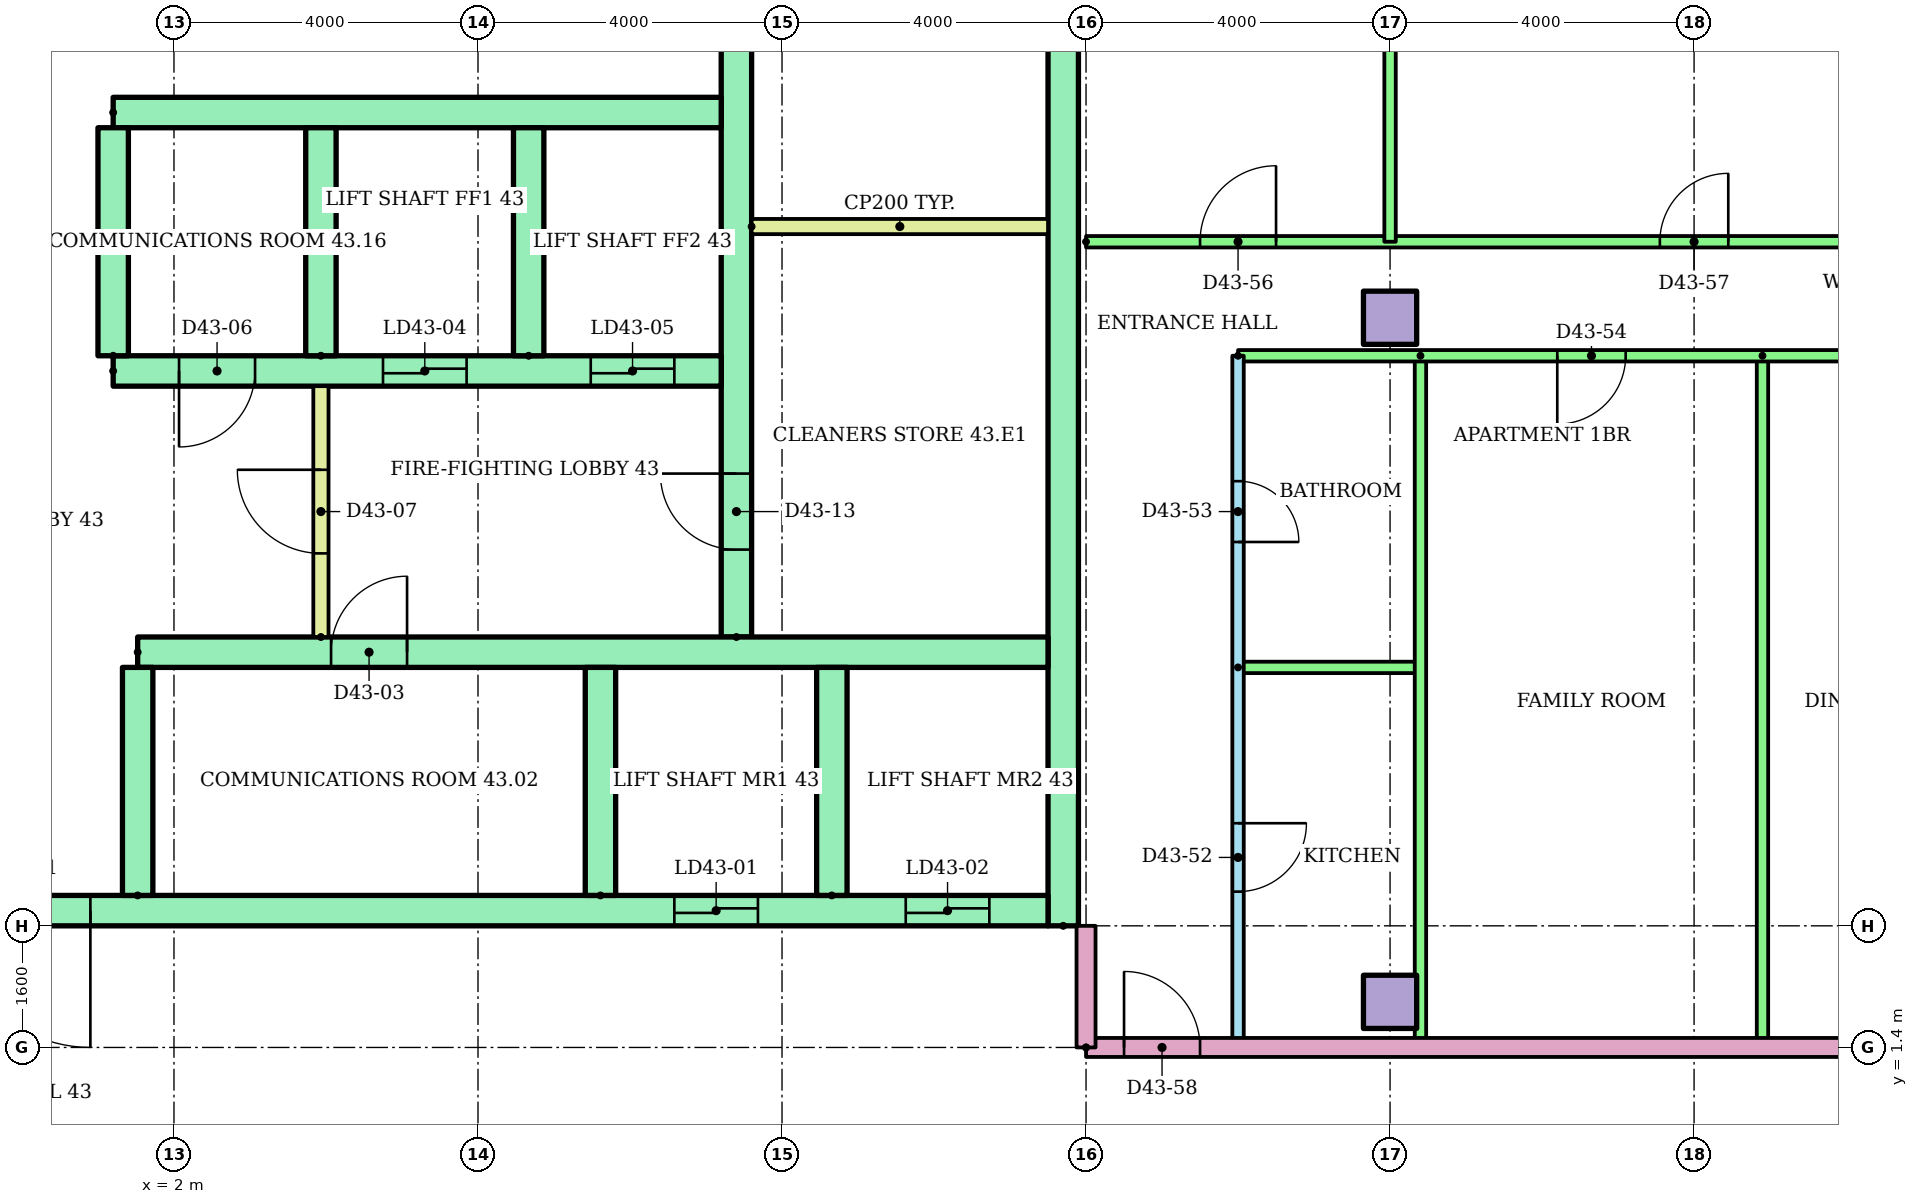
"""IFC4 building model, lengths in metres.
Left out: names, types, materials, properties, quantities, classifications, styles, units other than length and angle.
Written with IfcOpenShell. Run it as: python <this file> out.ifc"""

import sys

from ifc_helpers import new_model, si_unit, direction, frame, frame_2d, origin, origin_2d, place, context, subcontext, project, spatial, rectangle, extrude, element, fill, save


model = new_model("IFC4")
c1 = context("Model", 3, precision=1e-05, world=origin(), true_north=direction((0.0, 1.0)))
c2 = subcontext(c1, "Body", "Model", "MODEL_VIEW")
j1 = project(units=[si_unit("LENGTHUNIT", "METRE"), si_unit("PLANEANGLEUNIT", "RADIAN")], contexts=[c1])
p1 = place(None, origin())
s1 = spatial("IfcSite", under=j1, at=p1, CompositionType="ELEMENT")
p2 = place(p1, origin())
s2 = spatial("IfcBuilding", under=s1, at=p2, CompositionType="ELEMENT")
p3 = place(p2, frame((0.0, 0.0, 168.5)))
s3 = spatial("IfcBuildingStorey", under=s2, at=p3, CompositionType="ELEMENT", Elevation=168.5)
for number, where in (
    (1, (18.0, 2.0, 0.0)),
    (2, (18.0, 11.0, 0.0)),
):
    element("IfcColumn", number, at=place(p3, frame(where)), inside=s3, PredefinedType="COLUMN", context=c2, shape_type="SweptSolid", body=[
        extrude(rectangle(XDim=0.7, YDim=0.7, at=origin_2d()), origin(), (0.0, 0.0, 1.0), 3.2),
    ])
p4 = place(p3, frame((13.7, 3.0, 0.0), z_axis=(0.0, 0.0, 1.0), x_axis=(0.0, 1.0, 0.0)))
e3 = element("IfcWall", 3, at=p4, inside=s3, PredefinedType="SHEAR", context=c2, shape_type="SweptSolid", body=[
    extrude(rectangle(XDim=17.0, YDim=0.4, at=frame_2d((8.5, 0.0))), origin(), (0.0, 0.0, 1.0), 2.92),
])
p5 = place(p3, frame((9.4, 6.8, 0.0), z_axis=(0.0, 0.0, 1.0), x_axis=(0.0, 1.0, 0.0)))
e4 = element("IfcWall", 4, at=p5, inside=s3, PredefinedType="SHEAR", context=c2, shape_type="SweptSolid", body=[
    extrude(rectangle(XDim=12.7, YDim=0.4, at=frame_2d((6.35, 0.0))), origin(), (0.0, 0.0, 1.0), 2.92),
])
p6 = place(p5, frame((1.15, 0.0, 0.0)))
e5 = element("IfcOpeningElement", 5, at=p6, cuts=e4, PredefinedType="OPENING", context=c2, shape_type="SweptSolid", body=[
    extrude(rectangle(XDim=1.0, YDim=2.1, at=frame_2d((0.5, 1.05))), frame((0.0, 0.21, 0.0), z_axis=(0.0, -1.0, 0.0), x_axis=(1.0, 0.0, 0.0)), (0.0, 0.0, 1.0), 0.42),
])
p7 = place(p5, frame((7.925, 0.0, 0.0)))
e6 = element("IfcOpeningElement", 6, at=p7, cuts=e4, PredefinedType="OPENING", context=c2, shape_type="SweptSolid", body=[
    extrude(rectangle(XDim=1.0, YDim=2.1, at=frame_2d((0.5, 1.05))), frame((0.0, 0.21, 0.0), z_axis=(0.0, -1.0, 0.0), x_axis=(1.0, 0.0, 0.0)), (0.0, 0.0, 1.0), 0.42),
])
p8 = place(p3, frame((-13.5, 3.2, 0.0)))
e7 = element("IfcWall", 7, at=p8, inside=s3, PredefinedType="SHEAR", context=c2, shape_type="SweptSolid", body=[
    extrude(rectangle(XDim=27.0, YDim=0.4, at=frame_2d((13.5, 0.0))), origin(), (0.0, 0.0, 1.0), 2.92),
])
p9 = place(p8, frame((22.083, 0.0, 0.0)))
e8 = element("IfcOpeningElement", 8, at=p9, cuts=e7, PredefinedType="OPENING", context=c2, shape_type="SweptSolid", body=[
    extrude(rectangle(XDim=1.1, YDim=2.1, at=frame_2d((0.55, 1.05))), frame((0.0, 0.21, 0.0), z_axis=(0.0, -1.0, 0.0), x_axis=(1.0, 0.0, 0.0)), (0.0, 0.0, 1.0), 0.42),
])
p10 = place(p8, frame((25.128, 0.0, 0.0)))
e9 = element("IfcOpeningElement", 9, at=p10, cuts=e7, PredefinedType="OPENING", context=c2, shape_type="SweptSolid", body=[
    extrude(rectangle(XDim=1.1, YDim=2.1, at=frame_2d((0.55, 1.05))), frame((0.0, 0.21, 0.0), z_axis=(0.0, -1.0, 0.0), x_axis=(1.0, 0.0, 0.0)), (0.0, 0.0, 1.0), 0.42),
])
p11 = place(p8, frame((12.6, 0.0, 0.0)))
e10 = element("IfcOpeningElement", 10, at=p11, cuts=e7, PredefinedType="OPENING", context=c2, shape_type="SweptSolid", body=[
    extrude(rectangle(XDim=1.8, YDim=2.1, at=frame_2d((0.9, 1.05))), frame((0.0, 0.21, 0.0), z_axis=(0.0, -1.0, 0.0), x_axis=(1.0, 0.0, 0.0)), (0.0, 0.0, 1.0), 0.42),
])
p12 = place(p3, frame((1.522, 6.6, 0.0)))
e11 = element("IfcWall", 11, at=p12, inside=s3, PredefinedType="SHEAR", context=c2, shape_type="SweptSolid", body=[
    extrude(rectangle(XDim=11.978, YDim=0.4, at=frame_2d((5.989, 0.0))), origin(), (0.0, 0.0, 1.0), 2.92),
])
p13 = place(p12, frame((2.544, 0.0, 0.0)))
e12 = element("IfcOpeningElement", 12, at=p13, cuts=e11, PredefinedType="OPENING", context=c2, shape_type="SweptSolid", body=[
    extrude(rectangle(XDim=1.0, YDim=2.1, at=frame_2d((0.5, 1.05))), frame((0.0, 0.21, 0.0), z_axis=(0.0, -1.0, 0.0), x_axis=(1.0, 0.0, 0.0)), (0.0, 0.0, 1.0), 0.42),
])
for number, where, z_axis, x_axis in (
    (13, (1.522, 3.4, 0.0), (0.0, 0.0, 1.0), (0.0, 1.0, 0.0)),
    (14, (7.611, 3.4, 0.0), (0.0, 0.0, 1.0), (0.0, 1.0, 0.0)),
    (15, (10.656, 3.4, 0.0), (0.0, 0.0, 1.0), (0.0, 1.0, 0.0)),
):
    element("IfcWall", number, at=place(p3, frame(where, z_axis=z_axis, x_axis=x_axis)), inside=s3, PredefinedType="SHEAR", context=c2, shape_type="SweptSolid", body=[
        extrude(rectangle(XDim=3.0, YDim=0.4, at=frame_2d((1.5, 0.0))), origin(), (0.0, 0.0, 1.0), 2.92),
    ])
p14 = place(p3, frame((1.2, 10.3, 0.0)))
e16 = element("IfcWall", 16, at=p14, inside=s3, PredefinedType="SHEAR", context=c2, shape_type="SweptSolid", body=[
    extrude(rectangle(XDim=8.0, YDim=0.4, at=frame_2d((4.0, 0.0))), origin(), (0.0, 0.0, 1.0), 2.92),
])
p15 = place(p14, frame((3.55, 0.0, 0.0)))
e17 = element("IfcOpeningElement", 17, at=p15, cuts=e16, PredefinedType="OPENING", context=c2, shape_type="SweptSolid", body=[
    extrude(rectangle(XDim=1.1, YDim=2.1, at=frame_2d((0.55, 1.05))), frame((0.0, 0.21, 0.0), z_axis=(0.0, -1.0, 0.0), x_axis=(1.0, 0.0, 0.0)), (0.0, 0.0, 1.0), 0.42),
])
p16 = place(p14, frame((6.283, 0.0, 0.0)))
e18 = element("IfcOpeningElement", 18, at=p16, cuts=e16, PredefinedType="OPENING", context=c2, shape_type="SweptSolid", body=[
    extrude(rectangle(XDim=1.1, YDim=2.1, at=frame_2d((0.55, 1.05))), frame((0.0, 0.21, 0.0), z_axis=(0.0, -1.0, 0.0), x_axis=(1.0, 0.0, 0.0)), (0.0, 0.0, 1.0), 0.42),
])
p17 = place(p14, frame((0.867, 0.0, 0.0)))
e19 = element("IfcOpeningElement", 19, at=p17, cuts=e16, PredefinedType="OPENING", context=c2, shape_type="SweptSolid", body=[
    extrude(rectangle(XDim=1.0, YDim=2.1, at=frame_2d((0.5, 1.05))), frame((0.0, 0.21, 0.0), z_axis=(0.0, -1.0, 0.0), x_axis=(1.0, 0.0, 0.0)), (0.0, 0.0, 1.0), 0.42),
])
p18 = place(p3, frame((1.2, 13.7, 0.0)))
e20 = element("IfcWall", 20, at=p18, inside=s3, PredefinedType="SHEAR", context=c2, shape_type="SweptSolid", body=[
    extrude(rectangle(XDim=8.0, YDim=0.4, at=frame_2d((4.0, 0.0))), origin(), (0.0, 0.0, 1.0), 2.92),
])
for number, where, z_axis, x_axis in (
    (21, (1.2, 10.5, 0.0), (0.0, 0.0, 1.0), (0.0, 1.0, 0.0)),
    (22, (3.933, 10.5, 0.0), (0.0, 0.0, 1.0), (0.0, 1.0, 0.0)),
    (23, (6.667, 10.5, 0.0), (0.0, 0.0, 1.0), (0.0, 1.0, 0.0)),
):
    element("IfcWall", number, at=place(p3, frame(where, z_axis=z_axis, x_axis=x_axis)), inside=s3, PredefinedType="SHEAR", context=c2, shape_type="SweptSolid", body=[
        extrude(rectangle(XDim=3.0, YDim=0.4, at=frame_2d((1.5, 0.0))), origin(), (0.0, 0.0, 1.0), 2.92),
    ])
p19 = place(p3, frame((3.933, 6.8, 0.0), z_axis=(0.0, 0.0, 1.0), x_axis=(0.0, 1.0, 0.0)))
e24 = element("IfcWall", 24, at=p19, inside=s3, PredefinedType="PARTITIONING", context=c2, shape_type="SweptSolid", body=[
    extrude(rectangle(XDim=3.3, YDim=0.2, at=frame_2d((1.65, 0.0))), origin(), (0.0, 0.0, 1.0), 2.92),
])
p20 = place(p19, frame((1.1, 0.0, 0.0)))
e25 = element("IfcOpeningElement", 25, at=p20, cuts=e24, PredefinedType="OPENING", context=c2, shape_type="SweptSolid", body=[
    extrude(rectangle(XDim=1.1, YDim=2.1, at=frame_2d((0.55, 1.05))), frame((0.0, 0.11, 0.0), z_axis=(0.0, -1.0, 0.0), x_axis=(1.0, 0.0, 0.0)), (0.0, 0.0, 1.0), 0.22),
])
p21 = place(p3, frame((9.6, 12.2, 0.0)))
e26 = element("IfcWall", 26, at=p21, inside=s3, PredefinedType="PARTITIONING", context=c2, shape_type="SweptSolid", body=[
    extrude(rectangle(XDim=3.9, YDim=0.2, at=frame_2d((1.95, 0.0))), origin(), (0.0, 0.0, 1.0), 2.92),
])
p22 = place(p3, frame((16.0, 10.5, 0.0), z_axis=(0.0, 0.0, 1.0), x_axis=(0.0, -1.0, 0.0)))
e27 = element("IfcWall", 27, at=p22, inside=s3, PredefinedType="PARTITIONING", context=c2, shape_type="SweptSolid", body=[
    extrude(rectangle(XDim=9.1, YDim=0.15, at=frame_2d((4.55, 0.0))), origin(), (0.0, 0.0, 1.0), 2.4),
])
p23 = place(p22, frame((6.15, 0.0, 0.0)))
e28 = element("IfcOpeningElement", 28, at=p23, cuts=e27, PredefinedType="OPENING", context=c2, shape_type="SweptSolid", body=[
    extrude(rectangle(XDim=0.9, YDim=2.1, at=frame_2d((0.45, 1.05))), frame((0.0, 0.085, 0.0), z_axis=(0.0, -1.0, 0.0), x_axis=(1.0, 0.0, 0.0)), (0.0, 0.0, 1.0), 0.17),
])
p24 = place(p22, frame((1.65, 0.0, 0.0)))
e29 = element("IfcOpeningElement", 29, at=p24, cuts=e27, PredefinedType="OPENING", context=c2, shape_type="SweptSolid", body=[
    extrude(rectangle(XDim=0.8, YDim=2.1, at=frame_2d((0.4, 1.05))), frame((0.0, 0.085, 0.0), z_axis=(0.0, -1.0, 0.0), x_axis=(1.0, 0.0, 0.0)), (0.0, 0.0, 1.0), 0.17),
])
p25 = place(p3, frame((16.0, 6.4, 0.0)))
e30 = element("IfcWall", 30, at=p25, inside=s3, PredefinedType="PARTITIONING", context=c2, shape_type="SweptSolid", body=[
    extrude(rectangle(XDim=2.4, YDim=0.15, at=frame_2d((1.2, 0.0))), origin(), (0.0, 0.0, 1.0), 2.4),
])
for number, where, z_axis, x_axis in (
    (31, (18.4, 10.5, 0.0), (0.0, 0.0, 1.0), (0.0, -1.0, 0.0)),
    (32, (22.9, 10.5, 0.0), (0.0, 0.0, 1.0), (0.0, -1.0, 0.0)),
):
    element("IfcWall", number, at=place(p3, frame(where, z_axis=z_axis, x_axis=x_axis)), inside=s3, PredefinedType="PARTITIONING", context=c2, shape_type="SweptSolid", body=[
        extrude(rectangle(XDim=9.1, YDim=0.15, at=frame_2d((4.55, 0.0))), origin(), (0.0, 0.0, 1.0), 2.4),
    ])
p26 = place(p3, frame((26.0, 10.5, 0.0), z_axis=(0.0, 0.0, 1.0), x_axis=(-1.0, 0.0, 0.0)))
e33 = element("IfcWall", 33, at=p26, inside=s3, PredefinedType="PARTITIONING", context=c2, shape_type="SweptSolid", body=[
    extrude(rectangle(XDim=10.0, YDim=0.15, at=frame_2d((5.0, 0.0))), origin(), (0.0, 0.0, 1.0), 2.4),
])
p27 = place(p26, frame((4.9, 0.0, 0.0)))
e34 = element("IfcOpeningElement", 34, at=p27, cuts=e33, PredefinedType="OPENING", context=c2, shape_type="SweptSolid", body=[
    extrude(rectangle(XDim=0.9, YDim=2.1, at=frame_2d((0.45, 1.05))), frame((0.0, 0.085, 0.0), z_axis=(0.0, -1.0, 0.0), x_axis=(1.0, 0.0, 0.0)), (0.0, 0.0, 1.0), 0.17),
])
p28 = place(p26, frame((1.1, 0.0, 0.0)))
e35 = element("IfcOpeningElement", 35, at=p28, cuts=e33, PredefinedType="OPENING", context=c2, shape_type="SweptSolid", body=[
    extrude(rectangle(XDim=0.9, YDim=2.1, at=frame_2d((0.45, 1.05))), frame((0.0, 0.085, 0.0), z_axis=(0.0, -1.0, 0.0), x_axis=(1.0, 0.0, 0.0)), (0.0, 0.0, 1.0), 0.17),
])
p29 = place(p3, frame((14.0, 12.0, 0.0)))
e36 = element("IfcWall", 36, at=p29, inside=s3, PredefinedType="PARTITIONING", context=c2, shape_type="SweptSolid", body=[
    extrude(rectangle(XDim=12.0, YDim=0.15, at=frame_2d((6.0, 0.0))), origin(), (0.0, 0.0, 1.0), 2.4),
])
p30 = place(p29, frame((1.5, 0.0, 0.0)))
e37 = element("IfcOpeningElement", 37, at=p30, cuts=e36, PredefinedType="OPENING", context=c2, shape_type="SweptSolid", body=[
    extrude(rectangle(XDim=1.0, YDim=2.1, at=frame_2d((0.5, 1.05))), frame((0.0, 0.085, 0.0), z_axis=(0.0, -1.0, 0.0), x_axis=(1.0, 0.0, 0.0)), (0.0, 0.0, 1.0), 0.17),
])
p31 = place(p29, frame((7.55, 0.0, 0.0)))
e38 = element("IfcOpeningElement", 38, at=p31, cuts=e36, PredefinedType="OPENING", context=c2, shape_type="SweptSolid", body=[
    extrude(rectangle(XDim=0.9, YDim=2.1, at=frame_2d((0.45, 1.05))), frame((0.0, 0.085, 0.0), z_axis=(0.0, -1.0, 0.0), x_axis=(1.0, 0.0, 0.0)), (0.0, 0.0, 1.0), 0.17),
])
p32 = place(p3, frame((18.0, 18.821, 0.0), z_axis=(0.0, 0.0, 1.0), x_axis=(0.0, -1.0, 0.0)))
e39 = element("IfcWall", 39, at=p32, inside=s3, PredefinedType="PARTITIONING", context=c2, shape_type="SweptSolid", body=[
    extrude(rectangle(XDim=6.821, YDim=0.15, at=frame_2d((3.411, 0.0))), origin(), (0.0, 0.0, 1.0), 2.4),
])
p33 = place(p3, frame((14.0, 1.4, 0.0)))
e40 = element("IfcWall", 40, at=p33, inside=s3, PredefinedType="PARTITIONING", context=c2, shape_type="SweptSolid", body=[
    extrude(rectangle(XDim=15.0, YDim=0.25, at=frame_2d((7.5, 0.0))), origin(), (0.0, 0.0, 1.0), 2.4),
])
p34 = place(p33, frame((0.5, 0.0, 0.0)))
e41 = element("IfcOpeningElement", 41, at=p34, cuts=e40, PredefinedType="OPENING", context=c2, shape_type="SweptSolid", body=[
    extrude(rectangle(XDim=1.0, YDim=2.1, at=frame_2d((0.5, 1.05))), frame((0.0, 0.135, 0.0), z_axis=(0.0, -1.0, 0.0), x_axis=(1.0, 0.0, 0.0)), (0.0, 0.0, 1.0), 0.27),
])
p35 = place(p33, frame((12.547, 0.0, 0.0)))
e42 = element("IfcOpeningElement", 42, at=p35, cuts=e40, PredefinedType="OPENING", context=c2, shape_type="SweptSolid", body=[
    extrude(rectangle(XDim=1.0, YDim=2.1, at=frame_2d((0.5, 1.05))), frame((0.0, 0.135, 0.0), z_axis=(0.0, -1.0, 0.0), x_axis=(1.0, 0.0, 0.0)), (0.0, 0.0, 1.0), 0.27),
])
p36 = place(p3, frame((14.0, 1.4, 0.0), z_axis=(0.0, 0.0, 1.0), x_axis=(0.0, 1.0, 0.0)))
e43 = element("IfcWall", 43, at=p36, inside=s3, PredefinedType="PARTITIONING", context=c2, shape_type="SweptSolid", body=[
    extrude(rectangle(XDim=1.6, YDim=0.25, at=frame_2d((0.8, 0.0))), origin(), (0.0, 0.0, 1.0), 2.4),
])
p37 = place(p9, origin())
e44 = element("IfcDoor", 44, at=p37, inside=s3, OperationType="SLIDING_TO_LEFT", PredefinedType="DOOR", context=c2, shape_type="SweptSolid", body=[
    extrude(rectangle(XDim=1.1, YDim=2.1, at=frame_2d((0.55, 1.05))), frame((0.0, 0.025, 0.0), z_axis=(0.0, -1.0, 0.0), x_axis=(1.0, 0.0, 0.0)), (0.0, 0.0, 1.0), 0.05),
])
fill(e8, e44)
p38 = place(p10, origin())
e45 = element("IfcDoor", 45, at=p38, inside=s3, OperationType="SLIDING_TO_LEFT", PredefinedType="DOOR", context=c2, shape_type="SweptSolid", body=[
    extrude(rectangle(XDim=1.1, YDim=2.1, at=frame_2d((0.55, 1.05))), frame((0.0, 0.025, 0.0), z_axis=(0.0, -1.0, 0.0), x_axis=(1.0, 0.0, 0.0)), (0.0, 0.0, 1.0), 0.05),
])
fill(e9, e45)
p39 = place(p11, frame((1.8, 0.0, 0.0), z_axis=(0.0, 0.0, 1.0), x_axis=(-1.0, 0.0, 0.0)))
e46 = element("IfcDoor", 46, at=p39, inside=s3, OperationType="DOUBLE_DOOR_SINGLE_SWING", PredefinedType="DOOR", context=c2, shape_type="SweptSolid", body=[
    extrude(rectangle(XDim=1.8, YDim=2.1, at=frame_2d((0.9, 1.05))), frame((0.0, 0.025, 0.0), z_axis=(0.0, -1.0, 0.0), x_axis=(1.0, 0.0, 0.0)), (0.0, 0.0, 1.0), 0.05),
])
fill(e10, e46)
p40 = place(p13, origin())
e47 = element("IfcDoor", 47, at=p40, inside=s3, OperationType="SINGLE_SWING_RIGHT", PredefinedType="DOOR", context=c2, shape_type="SweptSolid", body=[
    extrude(rectangle(XDim=1.0, YDim=2.1, at=frame_2d((0.5, 1.05))), frame((0.0, 0.025, 0.0), z_axis=(0.0, -1.0, 0.0), x_axis=(1.0, 0.0, 0.0)), (0.0, 0.0, 1.0), 0.05),
])
fill(e12, e47)
p41 = place(p15, origin())
e48 = element("IfcDoor", 48, at=p41, inside=s3, OperationType="SLIDING_TO_LEFT", PredefinedType="DOOR", context=c2, shape_type="SweptSolid", body=[
    extrude(rectangle(XDim=1.1, YDim=2.1, at=frame_2d((0.55, 1.05))), frame((0.0, 0.025, 0.0), z_axis=(0.0, -1.0, 0.0), x_axis=(1.0, 0.0, 0.0)), (0.0, 0.0, 1.0), 0.05),
])
fill(e17, e48)
p42 = place(p16, origin())
e49 = element("IfcDoor", 49, at=p42, inside=s3, OperationType="SLIDING_TO_LEFT", PredefinedType="DOOR", context=c2, shape_type="SweptSolid", body=[
    extrude(rectangle(XDim=1.1, YDim=2.1, at=frame_2d((0.55, 1.05))), frame((0.0, 0.025, 0.0), z_axis=(0.0, -1.0, 0.0), x_axis=(1.0, 0.0, 0.0)), (0.0, 0.0, 1.0), 0.05),
])
fill(e18, e49)
p43 = place(p17, frame((1.0, 0.0, 0.0), z_axis=(0.0, 0.0, 1.0), x_axis=(-1.0, 0.0, 0.0)))
e50 = element("IfcDoor", 50, at=p43, inside=s3, OperationType="SINGLE_SWING_LEFT", PredefinedType="DOOR", context=c2, shape_type="SweptSolid", body=[
    extrude(rectangle(XDim=1.0, YDim=2.1, at=frame_2d((0.5, 1.05))), frame((0.0, 0.025, 0.0), z_axis=(0.0, -1.0, 0.0), x_axis=(1.0, 0.0, 0.0)), (0.0, 0.0, 1.0), 0.05),
])
fill(e19, e50)
p44 = place(p20, origin())
e51 = element("IfcDoor", 51, at=p44, inside=s3, OperationType="SINGLE_SWING_RIGHT", PredefinedType="DOOR", context=c2, shape_type="SweptSolid", body=[
    extrude(rectangle(XDim=1.1, YDim=2.1, at=frame_2d((0.55, 1.05))), frame((0.0, 0.025, 0.0), z_axis=(0.0, -1.0, 0.0), x_axis=(1.0, 0.0, 0.0)), (0.0, 0.0, 1.0), 0.05),
])
fill(e25, e51)
p45 = place(p6, origin())
e52 = element("IfcDoor", 52, at=p45, inside=s3, OperationType="SINGLE_SWING_RIGHT", PredefinedType="DOOR", context=c2, shape_type="SweptSolid", body=[
    extrude(rectangle(XDim=1.0, YDim=2.1, at=frame_2d((0.5, 1.05))), frame((0.0, 0.025, 0.0), z_axis=(0.0, -1.0, 0.0), x_axis=(1.0, 0.0, 0.0)), (0.0, 0.0, 1.0), 0.05),
])
fill(e5, e52)
p46 = place(p23, origin())
e53 = element("IfcDoor", 53, at=p46, inside=s3, OperationType="SINGLE_SWING_LEFT", PredefinedType="DOOR", context=c2, shape_type="SweptSolid", body=[
    extrude(rectangle(XDim=0.9, YDim=2.1, at=frame_2d((0.45, 1.05))), frame((0.0, 0.025, 0.0), z_axis=(0.0, -1.0, 0.0), x_axis=(1.0, 0.0, 0.0)), (0.0, 0.0, 1.0), 0.05),
])
fill(e28, e53)
p47 = place(p24, origin())
e54 = element("IfcDoor", 54, at=p47, inside=s3, OperationType="SINGLE_SWING_RIGHT", PredefinedType="DOOR", context=c2, shape_type="SweptSolid", body=[
    extrude(rectangle(XDim=0.8, YDim=2.1, at=frame_2d((0.4, 1.05))), frame((0.0, 0.025, 0.0), z_axis=(0.0, -1.0, 0.0), x_axis=(1.0, 0.0, 0.0)), (0.0, 0.0, 1.0), 0.05),
])
fill(e29, e54)
p48 = place(p27, origin())
e55 = element("IfcDoor", 55, at=p48, inside=s3, OperationType="SINGLE_SWING_RIGHT", PredefinedType="DOOR", context=c2, shape_type="SweptSolid", body=[
    extrude(rectangle(XDim=0.9, YDim=2.1, at=frame_2d((0.45, 1.05))), frame((0.0, 0.025, 0.0), z_axis=(0.0, -1.0, 0.0), x_axis=(1.0, 0.0, 0.0)), (0.0, 0.0, 1.0), 0.05),
])
fill(e34, e55)
p49 = place(p30, origin())
e56 = element("IfcDoor", 56, at=p49, inside=s3, OperationType="SINGLE_SWING_RIGHT", PredefinedType="DOOR", context=c2, shape_type="SweptSolid", body=[
    extrude(rectangle(XDim=1.0, YDim=2.1, at=frame_2d((0.5, 1.05))), frame((0.0, 0.025, 0.0), z_axis=(0.0, -1.0, 0.0), x_axis=(1.0, 0.0, 0.0)), (0.0, 0.0, 1.0), 0.05),
])
fill(e37, e56)
p50 = place(p31, origin())
e57 = element("IfcDoor", 57, at=p50, inside=s3, OperationType="SINGLE_SWING_RIGHT", PredefinedType="DOOR", context=c2, shape_type="SweptSolid", body=[
    extrude(rectangle(XDim=0.9, YDim=2.1, at=frame_2d((0.45, 1.05))), frame((0.0, 0.025, 0.0), z_axis=(0.0, -1.0, 0.0), x_axis=(1.0, 0.0, 0.0)), (0.0, 0.0, 1.0), 0.05),
])
fill(e38, e57)
p51 = place(p34, origin())
e58 = element("IfcDoor", 58, at=p51, inside=s3, OperationType="SINGLE_SWING_LEFT", PredefinedType="DOOR", context=c2, shape_type="SweptSolid", body=[
    extrude(rectangle(XDim=1.0, YDim=2.1, at=frame_2d((0.5, 1.05))), frame((0.0, 0.025, 0.0), z_axis=(0.0, -1.0, 0.0), x_axis=(1.0, 0.0, 0.0)), (0.0, 0.0, 1.0), 0.05),
])
fill(e41, e58)
save(model, sys.argv[1])
